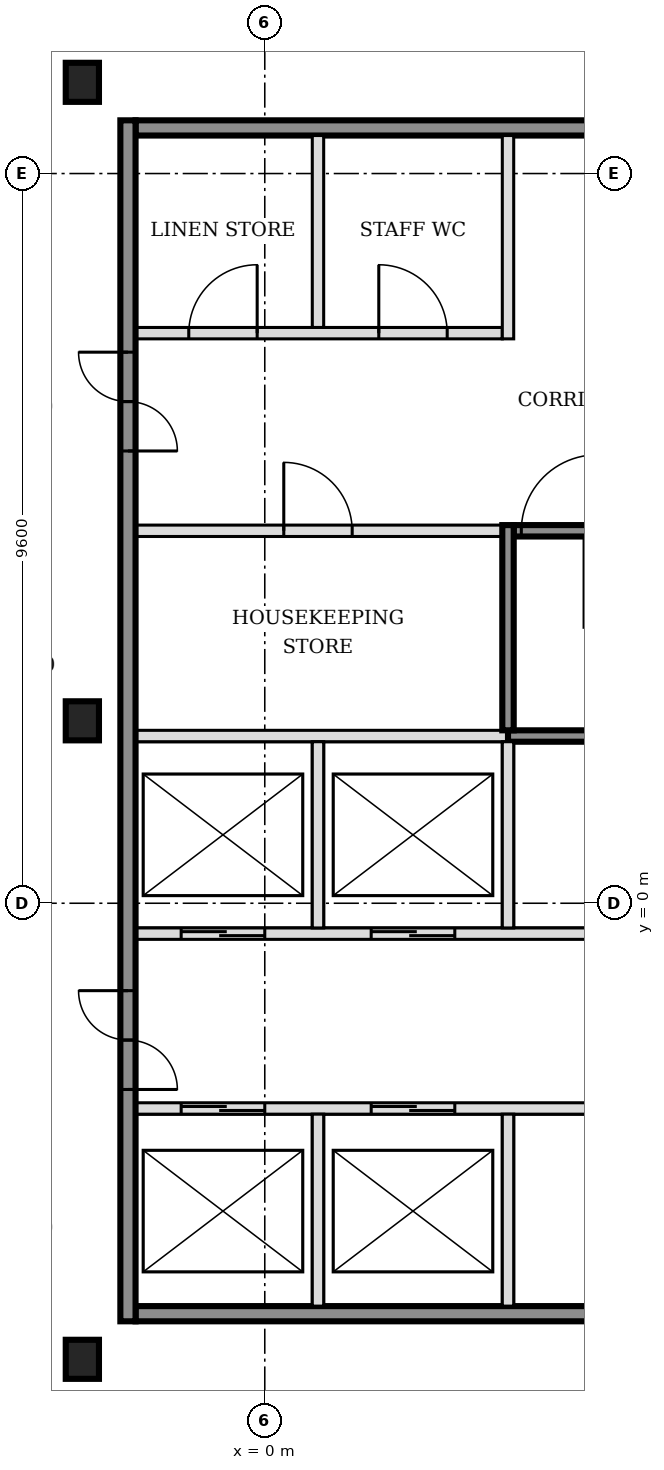
"""IFC4 building model, lengths in metres.
Left out: names, types, materials, properties, quantities, classifications, styles, units other than length and angle.
Written with IfcOpenShell. Run it as: python <this file> out.ifc"""

import sys

from ifc_helpers import new_model, si_unit, direction, frame, frame_2d, origin, origin_2d, place, context, subcontext, project, spatial, rectangle, i_section, extrude, element, fill, save


model = new_model("IFC4")
c1 = context("Model", 3, precision=1e-05, world=origin(), true_north=direction((0.0, 1.0)))
c2 = subcontext(c1, "Body", "Model", "MODEL_VIEW")
j1 = project(units=[si_unit("LENGTHUNIT", "METRE"), si_unit("PLANEANGLEUNIT", "RADIAN")], contexts=[c1])
p1 = place(None, origin())
s1 = spatial("IfcSite", under=j1, at=p1, CompositionType="ELEMENT")
p2 = place(p1, origin())
s2 = spatial("IfcBuilding", under=s1, at=p2, CompositionType="ELEMENT")
p3 = place(p2, frame((0.0, 0.0, 101.4)))
s3 = spatial("IfcBuildingStorey", under=s2, at=p3, CompositionType="ELEMENT", Elevation=101.4)
for number, where, z_axis, x_axis in (
    (1, (-2.4, -6.0, -0.15), (0.0, 0.0, 1.0), (1.0, 0.0, 0.0)),
    (2, (-2.4, 2.4, -0.15), (0.0, 0.0, 1.0), (1.0, 0.0, 0.0)),
    (3, (-2.4, 10.8, -0.15), (0.0, 0.0, 1.0), (1.0, 0.0, 0.0)),
):
    element("IfcColumn", number, at=place(p3, frame(where, z_axis=z_axis, x_axis=x_axis)), inside=s3, PredefinedType="COLUMN", context=c2, shape_type="SweptSolid", body=[
        extrude(i_section(OverallWidth=0.437, OverallDepth=0.514, WebThickness=0.061, FlangeThickness=0.097, FilletRadius=0.015, at=origin_2d()), origin(), (0.0, 0.0, 1.0), 3.6),
    ])
p4 = place(p3, frame((-1.7, -5.4, 0.0), z_axis=(0.0, 0.0, 1.0), x_axis=(1.0, 0.0, 0.0)))
e4 = element("IfcWall", 4, at=p4, inside=s3, PredefinedType="SOLIDWALL", context=c2, shape_type="SweptSolid", body=[
    extrude(rectangle(XDim=7.9, YDim=0.2, at=frame_2d((3.95, 0.0))), origin(), (0.0, 0.0, 1.0), 3.45),
])
p5 = place(p3, frame((-1.7, -2.7, 0.0), z_axis=(0.0, 0.0, 1.0), x_axis=(1.0, 0.0, 0.0)))
e5 = element("IfcWall", 5, at=p5, inside=s3, PredefinedType="SOLIDWALL", context=c2, shape_type="SweptSolid", body=[
    extrude(rectangle(XDim=7.9, YDim=0.15, at=frame_2d((3.95, 0.0))), origin(), (0.0, 0.0, 1.0), 3.45),
])
p6 = place(p5, frame((0.6, 0.0, 0.0)))
e6 = element("IfcOpeningElement", 6, at=p6, cuts=e5, PredefinedType="OPENING", context=c2, shape_type="SweptSolid", body=[
    extrude(rectangle(XDim=1.1, YDim=2.1, at=frame_2d((0.55, 1.05))), frame((0.0, 0.085, 0.0), z_axis=(0.0, -1.0, 0.0), x_axis=(1.0, 0.0, 0.0)), (0.0, 0.0, 1.0), 0.17),
])
p7 = place(p5, frame((3.1, 0.0, 0.0)))
e7 = element("IfcOpeningElement", 7, at=p7, cuts=e5, PredefinedType="OPENING", context=c2, shape_type="SweptSolid", body=[
    extrude(rectangle(XDim=1.1, YDim=2.1, at=frame_2d((0.55, 1.05))), frame((0.0, 0.085, 0.0), z_axis=(0.0, -1.0, 0.0), x_axis=(1.0, 0.0, 0.0)), (0.0, 0.0, 1.0), 0.17),
])
p8 = place(p3, frame((-1.7, -0.4, 0.0), z_axis=(0.0, 0.0, 1.0), x_axis=(1.0, 0.0, 0.0)))
e8 = element("IfcWall", 8, at=p8, inside=s3, PredefinedType="SOLIDWALL", context=c2, shape_type="SweptSolid", body=[
    extrude(rectangle(XDim=15.925, YDim=0.15, at=frame_2d((7.962, 0.0))), origin(), (0.0, 0.0, 1.0), 3.45),
])
p9 = place(p8, frame((0.6, 0.0, 0.0)))
e9 = element("IfcOpeningElement", 9, at=p9, cuts=e8, PredefinedType="OPENING", context=c2, shape_type="SweptSolid", body=[
    extrude(rectangle(XDim=1.1, YDim=2.1, at=frame_2d((0.55, 1.05))), frame((0.0, 0.085, 0.0), z_axis=(0.0, -1.0, 0.0), x_axis=(1.0, 0.0, 0.0)), (0.0, 0.0, 1.0), 0.17),
])
p10 = place(p8, frame((3.1, 0.0, 0.0)))
e10 = element("IfcOpeningElement", 10, at=p10, cuts=e8, PredefinedType="OPENING", context=c2, shape_type="SweptSolid", body=[
    extrude(rectangle(XDim=1.1, YDim=2.1, at=frame_2d((0.55, 1.05))), frame((0.0, 0.085, 0.0), z_axis=(0.0, -1.0, 0.0), x_axis=(1.0, 0.0, 0.0)), (0.0, 0.0, 1.0), 0.17),
])
p11 = place(p8, frame((11.575, 0.0, 0.0)))
e11 = element("IfcOpeningElement", 11, at=p11, cuts=e8, PredefinedType="OPENING", context=c2, shape_type="SweptSolid", body=[
    extrude(rectangle(XDim=1.2, YDim=2.1, at=frame_2d((0.6, 1.05))), frame((0.0, 0.085, 0.0), z_axis=(0.0, -1.0, 0.0), x_axis=(1.0, 0.0, 0.0)), (0.0, 0.0, 1.0), 0.17),
])
p12 = place(p8, frame((14.125, 0.0, 0.0)))
e12 = element("IfcOpeningElement", 12, at=p12, cuts=e8, PredefinedType="OPENING", context=c2, shape_type="SweptSolid", body=[
    extrude(rectangle(XDim=1.2, YDim=2.1, at=frame_2d((0.6, 1.05))), frame((0.0, 0.085, 0.0), z_axis=(0.0, -1.0, 0.0), x_axis=(1.0, 0.0, 0.0)), (0.0, 0.0, 1.0), 0.17),
])
p13 = place(p3, frame((-1.7, 2.2, 0.0), z_axis=(0.0, 0.0, 1.0), x_axis=(1.0, 0.0, 0.0)))
e13 = element("IfcWall", 13, at=p13, inside=s3, PredefinedType="SOLIDWALL", context=c2, shape_type="SweptSolid", body=[
    extrude(rectangle(XDim=4.9, YDim=0.15, at=frame_2d((2.45, 0.0))), origin(), (0.0, 0.0, 1.0), 3.45),
])
p14 = place(p3, frame((3.2, 2.2, 0.0), z_axis=(0.0, 0.0, 1.0), x_axis=(1.0, 0.0, 0.0)))
e14 = element("IfcWall", 14, at=p14, inside=s3, PredefinedType="SOLIDWALL", context=c2, shape_type="SweptSolid", body=[
    extrude(rectangle(XDim=6.5, YDim=0.15, at=frame_2d((3.25, 0.0))), origin(), (0.0, 0.0, 1.0), 3.45),
])
p15 = place(p3, frame((-1.7, 4.9, 0.0), z_axis=(0.0, 0.0, 1.0), x_axis=(1.0, 0.0, 0.0)))
e15 = element("IfcWall", 15, at=p15, inside=s3, PredefinedType="PARTITIONING", context=c2, shape_type="SweptSolid", body=[
    extrude(rectangle(XDim=4.825, YDim=0.15, at=frame_2d((2.413, 0.0))), origin(), (0.0, 0.0, 1.0), 3.45),
])
p16 = place(p15, frame((1.95, 0.0, 0.0)))
e16 = element("IfcOpeningElement", 16, at=p16, cuts=e15, PredefinedType="OPENING", context=c2, shape_type="SweptSolid", body=[
    extrude(rectangle(XDim=0.9, YDim=2.1, at=frame_2d((0.45, 1.05))), frame((0.0, 0.085, 0.0), z_axis=(0.0, -1.0, 0.0), x_axis=(1.0, 0.0, 0.0)), (0.0, 0.0, 1.0), 0.17),
])
p17 = place(p3, frame((3.275, 4.9, 0.0), z_axis=(0.0, 0.0, 1.0), x_axis=(1.0, 0.0, 0.0)))
e17 = element("IfcWall", 17, at=p17, inside=s3, PredefinedType="SOLIDWALL", context=c2, shape_type="SweptSolid", body=[
    extrude(rectangle(XDim=6.425, YDim=0.15, at=frame_2d((3.212, 0.0))), origin(), (0.0, 0.0, 1.0), 3.45),
])
p18 = place(p17, frame((0.1, 0.0, 0.0)))
e18 = element("IfcOpeningElement", 18, at=p18, cuts=e17, PredefinedType="OPENING", context=c2, shape_type="SweptSolid", body=[
    extrude(rectangle(XDim=1.0, YDim=2.1, at=frame_2d((0.5, 1.05))), frame((0.0, 0.085, 0.0), z_axis=(0.0, -1.0, 0.0), x_axis=(1.0, 0.0, 0.0)), (0.0, 0.0, 1.0), 0.17),
])
p19 = place(p3, frame((-1.7, 7.5, 0.0), z_axis=(0.0, 0.0, 1.0), x_axis=(1.0, 0.0, 0.0)))
e19 = element("IfcWall", 19, at=p19, inside=s3, PredefinedType="PARTITIONING", context=c2, shape_type="SweptSolid", body=[
    extrude(rectangle(XDim=4.825, YDim=0.15, at=frame_2d((2.413, 0.0))), origin(), (0.0, 0.0, 1.0), 3.45),
])
p20 = place(p19, frame((0.7, 0.0, 0.0)))
e20 = element("IfcOpeningElement", 20, at=p20, cuts=e19, PredefinedType="OPENING", context=c2, shape_type="SweptSolid", body=[
    extrude(rectangle(XDim=0.9, YDim=2.1, at=frame_2d((0.45, 1.05))), frame((0.0, 0.085, 0.0), z_axis=(0.0, -1.0, 0.0), x_axis=(1.0, 0.0, 0.0)), (0.0, 0.0, 1.0), 0.17),
])
p21 = place(p19, frame((3.2, 0.0, 0.0)))
e21 = element("IfcOpeningElement", 21, at=p21, cuts=e19, PredefinedType="OPENING", context=c2, shape_type="SweptSolid", body=[
    extrude(rectangle(XDim=0.9, YDim=2.1, at=frame_2d((0.45, 1.05))), frame((0.0, 0.085, 0.0), z_axis=(0.0, -1.0, 0.0), x_axis=(1.0, 0.0, 0.0)), (0.0, 0.0, 1.0), 0.17),
])
p22 = place(p3, frame((-1.7, 10.2, 0.0), z_axis=(0.0, 0.0, 1.0), x_axis=(1.0, 0.0, 0.0)))
e22 = element("IfcWall", 22, at=p22, inside=s3, PredefinedType="SOLIDWALL", context=c2, shape_type="SweptSolid", body=[
    extrude(rectangle(XDim=7.9, YDim=0.2, at=frame_2d((3.95, 0.0))), origin(), (0.0, 0.0, 1.0), 3.45),
])
p23 = place(p3, frame((-1.8, -5.5, 0.0), z_axis=(0.0, 0.0, 1.0), x_axis=(0.0, 1.0, 0.0)))
e23 = element("IfcWall", 23, at=p23, inside=s3, PredefinedType="SOLIDWALL", context=c2, shape_type="SweptSolid", body=[
    extrude(rectangle(XDim=15.8, YDim=0.2, at=frame_2d((7.9, 0.0))), origin(), (0.0, 0.0, 1.0), 3.45),
])
p24 = place(p23, frame((3.05, 0.0, 0.0)))
e24 = element("IfcOpeningElement", 24, at=p24, cuts=e23, PredefinedType="OPENING", context=c2, shape_type="SweptSolid", body=[
    extrude(rectangle(XDim=1.3, YDim=2.1, at=frame_2d((0.65, 1.05))), frame((0.0, 0.11, 0.0), z_axis=(0.0, -1.0, 0.0), x_axis=(1.0, 0.0, 0.0)), (0.0, 0.0, 1.0), 0.22),
])
p25 = place(p23, frame((11.45, 0.0, 0.0)))
e25 = element("IfcOpeningElement", 25, at=p25, cuts=e23, PredefinedType="OPENING", context=c2, shape_type="SweptSolid", body=[
    extrude(rectangle(XDim=1.3, YDim=2.1, at=frame_2d((0.65, 1.05))), frame((0.0, 0.11, 0.0), z_axis=(0.0, -1.0, 0.0), x_axis=(1.0, 0.0, 0.0)), (0.0, 0.0, 1.0), 0.22),
])
p26 = place(p3, frame((0.7, -5.3, 0.0), z_axis=(0.0, 0.0, 1.0), x_axis=(0.0, 1.0, 0.0)))
e26 = element("IfcWall", 26, at=p26, inside=s3, PredefinedType="SOLIDWALL", context=c2, shape_type="SweptSolid", body=[
    extrude(rectangle(XDim=2.525, YDim=0.15, at=frame_2d((1.263, 0.0))), origin(), (0.0, 0.0, 1.0), 3.45),
])
p27 = place(p3, frame((0.7, -0.325, 0.0), z_axis=(0.0, 0.0, 1.0), x_axis=(0.0, 1.0, 0.0)))
e27 = element("IfcWall", 27, at=p27, inside=s3, PredefinedType="SOLIDWALL", context=c2, shape_type="SweptSolid", body=[
    extrude(rectangle(XDim=2.45, YDim=0.15, at=frame_2d((1.225, 0.0))), origin(), (0.0, 0.0, 1.0), 3.45),
])
p28 = place(p3, frame((0.7, 7.575, 0.0), z_axis=(0.0, 0.0, 1.0), x_axis=(0.0, 1.0, 0.0)))
e28 = element("IfcWall", 28, at=p28, inside=s3, PredefinedType="PARTITIONING", context=c2, shape_type="SweptSolid", body=[
    extrude(rectangle(XDim=2.525, YDim=0.15, at=frame_2d((1.263, 0.0))), origin(), (0.0, 0.0, 1.0), 3.45),
])
p29 = place(p3, frame((3.2, -5.3, 0.0), z_axis=(0.0, 0.0, 1.0), x_axis=(0.0, 1.0, 0.0)))
e29 = element("IfcWall", 29, at=p29, inside=s3, PredefinedType="SOLIDWALL", context=c2, shape_type="SweptSolid", body=[
    extrude(rectangle(XDim=2.525, YDim=0.15, at=frame_2d((1.263, 0.0))), origin(), (0.0, 0.0, 1.0), 3.45),
])
p30 = place(p3, frame((3.2, -0.325, 0.0), z_axis=(0.0, 0.0, 1.0), x_axis=(0.0, 1.0, 0.0)))
e30 = element("IfcWall", 30, at=p30, inside=s3, PredefinedType="SOLIDWALL", context=c2, shape_type="SweptSolid", body=[
    extrude(rectangle(XDim=2.45, YDim=0.15, at=frame_2d((1.225, 0.0))), origin(), (0.0, 0.0, 1.0), 3.45),
])
p31 = place(p3, frame((3.2, 2.275, 0.0), z_axis=(0.0, 0.0, 1.0), x_axis=(0.0, 1.0, 0.0)))
e31 = element("IfcWall", 31, at=p31, inside=s3, PredefinedType="SOLIDWALL", context=c2, shape_type="SweptSolid", body=[
    extrude(rectangle(XDim=2.7, YDim=0.15, at=frame_2d((1.35, 0.0))), origin(), (0.0, 0.0, 1.0), 3.45),
])
p32 = place(p3, frame((3.2, 7.425, 0.0), z_axis=(0.0, 0.0, 1.0), x_axis=(0.0, 1.0, 0.0)))
e32 = element("IfcWall", 32, at=p32, inside=s3, PredefinedType="PARTITIONING", context=c2, shape_type="SweptSolid", body=[
    extrude(rectangle(XDim=2.675, YDim=0.15, at=frame_2d((1.337, 0.0))), origin(), (0.0, 0.0, 1.0), 3.45),
])
p33 = place(p6, origin())
e33 = element("IfcDoor", 33, at=p33, inside=s3, OperationType="DOUBLE_DOOR_SLIDING", PredefinedType="DOOR", context=c2, shape_type="SweptSolid", body=[
    extrude(rectangle(XDim=1.1, YDim=2.1, at=frame_2d((0.55, 1.05))), frame((0.0, 0.025, 0.0), z_axis=(0.0, -1.0, 0.0), x_axis=(1.0, 0.0, 0.0)), (0.0, 0.0, 1.0), 0.05),
])
fill(e6, e33)
p34 = place(p7, origin())
e34 = element("IfcDoor", 34, at=p34, inside=s3, OperationType="DOUBLE_DOOR_SLIDING", PredefinedType="DOOR", context=c2, shape_type="SweptSolid", body=[
    extrude(rectangle(XDim=1.1, YDim=2.1, at=frame_2d((0.55, 1.05))), frame((0.0, 0.025, 0.0), z_axis=(0.0, -1.0, 0.0), x_axis=(1.0, 0.0, 0.0)), (0.0, 0.0, 1.0), 0.05),
])
fill(e7, e34)
p35 = place(p9, origin())
e35 = element("IfcDoor", 35, at=p35, inside=s3, OperationType="DOUBLE_DOOR_SLIDING", PredefinedType="DOOR", context=c2, shape_type="SweptSolid", body=[
    extrude(rectangle(XDim=1.1, YDim=2.1, at=frame_2d((0.55, 1.05))), frame((0.0, 0.025, 0.0), z_axis=(0.0, -1.0, 0.0), x_axis=(1.0, 0.0, 0.0)), (0.0, 0.0, 1.0), 0.05),
])
fill(e9, e35)
p36 = place(p10, origin())
e36 = element("IfcDoor", 36, at=p36, inside=s3, OperationType="DOUBLE_DOOR_SLIDING", PredefinedType="DOOR", context=c2, shape_type="SweptSolid", body=[
    extrude(rectangle(XDim=1.1, YDim=2.1, at=frame_2d((0.55, 1.05))), frame((0.0, 0.025, 0.0), z_axis=(0.0, -1.0, 0.0), x_axis=(1.0, 0.0, 0.0)), (0.0, 0.0, 1.0), 0.05),
])
fill(e10, e36)
p37 = place(p18, origin())
e37 = element("IfcDoor", 37, at=p37, inside=s3, OperationType="SINGLE_SWING_RIGHT", PredefinedType="DOOR", context=c2, shape_type="SweptSolid", body=[
    extrude(rectangle(XDim=1.0, YDim=2.1, at=frame_2d((0.5, 1.05))), frame((0.0, 0.025, 0.0), z_axis=(0.0, -1.0, 0.0), x_axis=(1.0, 0.0, 0.0)), (0.0, 0.0, 1.0), 0.05),
])
fill(e18, e37)
p38 = place(p24, origin())
e38 = element("IfcDoor", 38, at=p38, inside=s3, OperationType="DOUBLE_DOOR_SINGLE_SWING", PredefinedType="DOOR", context=c2, shape_type="SweptSolid", body=[
    extrude(rectangle(XDim=1.3, YDim=2.1, at=frame_2d((0.65, 1.05))), frame((0.0, 0.025, 0.0), z_axis=(0.0, -1.0, 0.0), x_axis=(1.0, 0.0, 0.0)), (0.0, 0.0, 1.0), 0.05),
])
fill(e24, e38)
p39 = place(p25, origin())
e39 = element("IfcDoor", 39, at=p39, inside=s3, OperationType="DOUBLE_DOOR_SINGLE_SWING", PredefinedType="DOOR", context=c2, shape_type="SweptSolid", body=[
    extrude(rectangle(XDim=1.3, YDim=2.1, at=frame_2d((0.65, 1.05))), frame((0.0, 0.025, 0.0), z_axis=(0.0, -1.0, 0.0), x_axis=(1.0, 0.0, 0.0)), (0.0, 0.0, 1.0), 0.05),
])
fill(e25, e39)
p40 = place(p16, origin())
e40 = element("IfcDoor", 40, at=p40, inside=s3, OperationType="SINGLE_SWING_LEFT", PredefinedType="DOOR", context=c2, shape_type="SweptSolid", body=[
    extrude(rectangle(XDim=0.9, YDim=2.1, at=frame_2d((0.45, 1.05))), frame((0.0, 0.025, 0.0), z_axis=(0.0, -1.0, 0.0), x_axis=(1.0, 0.0, 0.0)), (0.0, 0.0, 1.0), 0.05),
])
fill(e16, e40)
p41 = place(p20, origin())
e41 = element("IfcDoor", 41, at=p41, inside=s3, OperationType="SINGLE_SWING_RIGHT", PredefinedType="DOOR", context=c2, shape_type="SweptSolid", body=[
    extrude(rectangle(XDim=0.9, YDim=2.1, at=frame_2d((0.45, 1.05))), frame((0.0, 0.025, 0.0), z_axis=(0.0, -1.0, 0.0), x_axis=(1.0, 0.0, 0.0)), (0.0, 0.0, 1.0), 0.05),
])
fill(e20, e41)
p42 = place(p21, origin())
e42 = element("IfcDoor", 42, at=p42, inside=s3, OperationType="SINGLE_SWING_LEFT", PredefinedType="DOOR", context=c2, shape_type="SweptSolid", body=[
    extrude(rectangle(XDim=0.9, YDim=2.1, at=frame_2d((0.45, 1.05))), frame((0.0, 0.025, 0.0), z_axis=(0.0, -1.0, 0.0), x_axis=(1.0, 0.0, 0.0)), (0.0, 0.0, 1.0), 0.05),
])
fill(e21, e42)
save(model, sys.argv[1])
